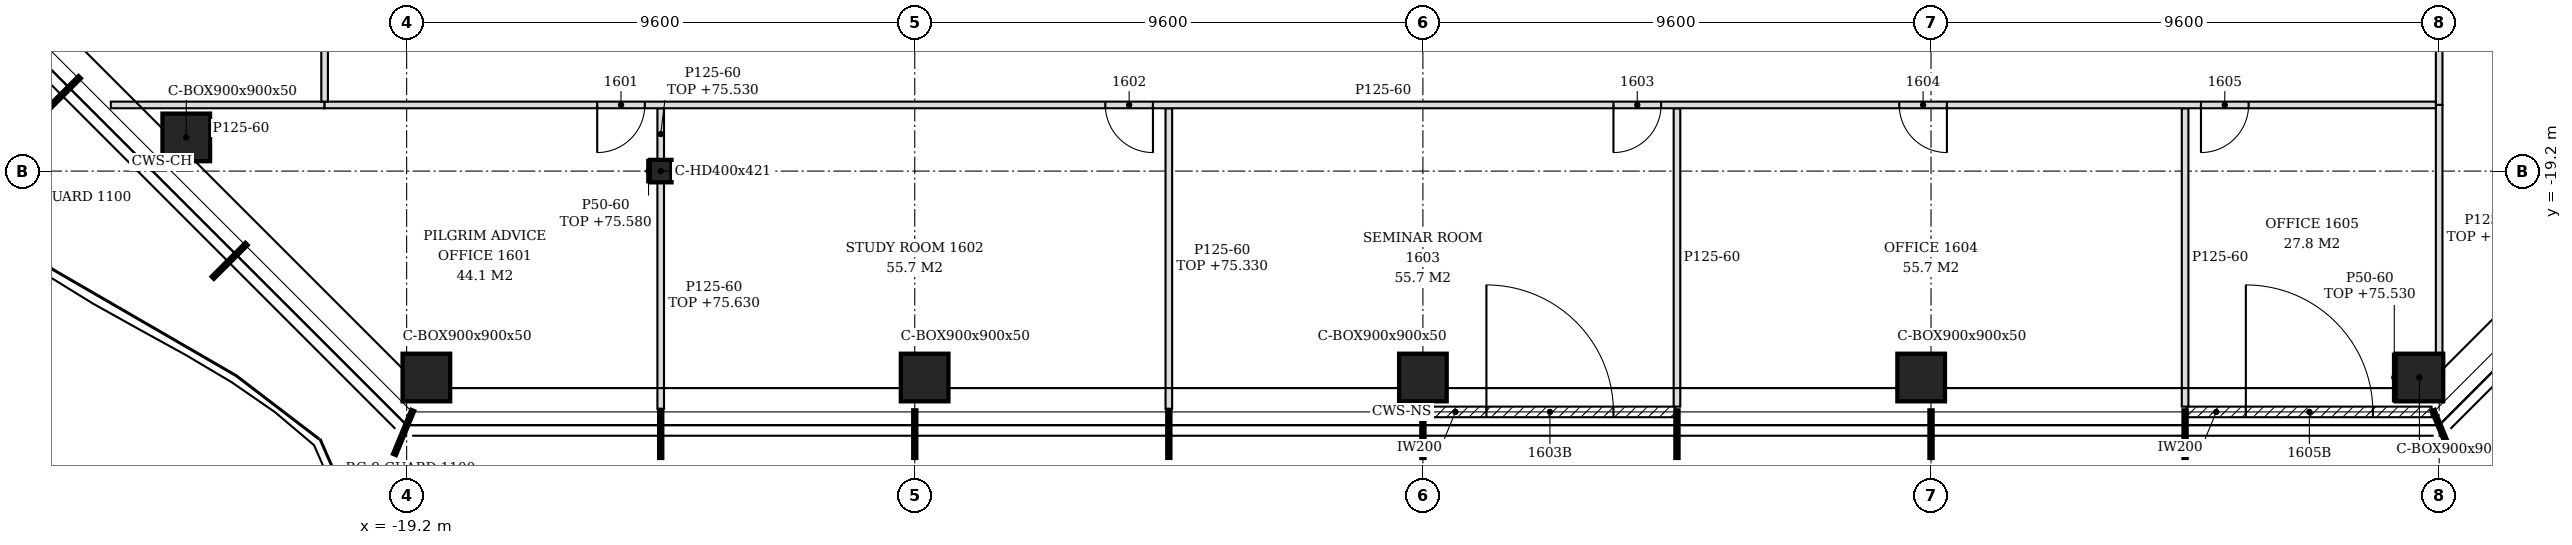
"""IFC4 building model, lengths in metres.
Left out: names, types, materials, properties, quantities, classifications, styles, units other than length and angle.
Written with IfcOpenShell. Run it as: python <this file> out.ifc"""

import sys

from ifc_helpers import new_model, si_unit, direction, frame, frame_2d, origin, origin_2d, place, context, subcontext, project, spatial, polyline, rectangle, hollow_rectangle, i_section, outline, extrude, element, fill, save


model = new_model("IFC4")
c1 = context("Model", 3, precision=1e-05, world=origin(), true_north=direction((0.0, 1.0)))
c2 = subcontext(c1, "Body", "Model", "MODEL_VIEW")
j1 = project(units=[si_unit("LENGTHUNIT", "METRE"), si_unit("PLANEANGLEUNIT", "RADIAN")], contexts=[c1])
p1 = place(None, origin())
s1 = spatial("IfcSite", under=j1, at=p1, CompositionType="ELEMENT")
p2 = place(p1, origin())
s2 = spatial("IfcBuilding", under=s1, at=p2, CompositionType="ELEMENT")
p3 = place(p2, frame((0.0, 0.0, 72.6)))
s3 = spatial("IfcBuildingStorey", under=s2, at=p3, CompositionType="ELEMENT", Elevation=72.6)
for number, where, z_axis, x_axis in (
    (1, (-18.827, -23.1, -0.15), (0.0, 0.0, 1.0), (1.0, 0.0, 0.0)),
    (2, (-9.414, -23.1, -0.15), (0.0, 0.0, 1.0), (1.0, 0.0, 0.0)),
    (3, (0.0, -23.1, -0.15), (0.0, 0.0, 1.0), (1.0, 0.0, 0.0)),
    (4, (9.414, -23.1, -0.15), (0.0, 0.0, 1.0), (1.0, 0.0, 0.0)),
    (5, (18.827, -23.1, -0.15), (0.0, 0.0, 1.0), (1.0, 0.0, 0.0)),
    (6, (-23.364, -18.564, -0.15), (0.0, 0.0, 1.0), (1.0, 0.0, 0.0)),
):
    element("IfcColumn", number, at=place(p3, frame(where, z_axis=z_axis, x_axis=x_axis)), inside=s3, PredefinedType="COLUMN", context=c2, shape_type="SweptSolid", body=[
        extrude(hollow_rectangle(XDim=0.9, YDim=0.9, WallThickness=0.05, at=origin_2d()), origin(), (0.0, 0.0, 1.0), 3.6),
    ])
p4 = place(p3, frame((-14.4, -19.2, -0.15), z_axis=(0.0, 0.0, 1.0), x_axis=(1.0, 0.0, 0.0)))
e7 = element("IfcColumn", 7, at=p4, inside=s3, PredefinedType="COLUMN", context=c2, shape_type="SweptSolid", body=[
    extrude(i_section(OverallWidth=0.409, OverallDepth=0.425, WebThickness=0.033, FlangeThickness=0.052, FilletRadius=0.015, at=origin_2d()), origin(), (0.0, 0.0, 1.0), 3.6),
])
p5 = place(p3, frame((0.03, -23.75, 0.0), z_axis=(0.0, 0.0, 1.0), x_axis=(1.0, 0.0, 0.0)))
e8 = element("IfcWall", 8, at=p5, inside=s3, PredefinedType="NOTDEFINED", context=c2, shape_type="SweptSolid", body=[
    extrude(rectangle(XDim=4.74, YDim=0.2, at=frame_2d((2.37, 0.0))), origin(), (0.0, 0.0, 1.0), 3.45),
])
p6 = place(p5, frame((1.17, 0.0, 0.0)))
e9 = element("IfcOpeningElement", 9, at=p6, cuts=e8, PredefinedType="OPENING", context=c2, shape_type="SweptSolid", body=[
    extrude(rectangle(XDim=2.4, YDim=2.4, at=frame_2d((1.2, 1.2))), frame((0.0, 0.11, 0.0), z_axis=(0.0, -1.0, 0.0), x_axis=(1.0, 0.0, 0.0)), (0.0, 0.0, 1.0), 0.22),
])
p7 = place(p3, frame((14.43, -23.75, 0.0), z_axis=(0.0, 0.0, 1.0), x_axis=(1.0, 0.0, 0.0)))
e10 = element("IfcWall", 10, at=p7, inside=s3, PredefinedType="NOTDEFINED", context=c2, shape_type="SweptSolid", body=[
    extrude(rectangle(XDim=4.626, YDim=0.2, at=frame_2d((2.313, 0.0))), origin(), (0.0, 0.0, 1.0), 3.45),
])
p8 = place(p7, frame((1.118, 0.0, 0.0)))
e11 = element("IfcOpeningElement", 11, at=p8, cuts=e10, PredefinedType="OPENING", context=c2, shape_type="SweptSolid", body=[
    extrude(rectangle(XDim=2.4, YDim=2.4, at=frame_2d((1.2, 1.2))), frame((0.0, 0.11, 0.0), z_axis=(0.0, -1.0, 0.0), x_axis=(1.0, 0.0, 0.0)), (0.0, 0.0, 1.0), 0.22),
])
p9 = place(p3, frame((-14.4, -23.69, 0.0), z_axis=(0.0, 0.0, 1.0), x_axis=(0.0, 1.0, 0.0)))
e12 = element("IfcWall", 12, at=p9, inside=s3, PredefinedType="PARTITIONING", context=c2, shape_type="SweptSolid", body=[
    extrude(outline(polyline([(0.0, 0.0), (4.277, 0.0), (4.278, 3.03), (0.74, 3.03), (0.738, 2.93), (0.44, 2.93), (0.438, 3.03), (0.0, 3.03), (0.0, 0.0)])), frame((0.0, 0.062, 0.0), z_axis=(0.0, -1.0, 0.0), x_axis=(1.0, 0.0, 0.0)), (0.0, 0.0, 1.0), 0.125),
])
p10 = place(p3, frame((-4.8, -23.69, 0.0), z_axis=(0.0, 0.0, 1.0), x_axis=(0.0, 1.0, 0.0)))
e13 = element("IfcWall", 13, at=p10, inside=s3, PredefinedType="PARTITIONING", context=c2, shape_type="SweptSolid", body=[
    extrude(rectangle(XDim=5.677, YDim=0.125, at=frame_2d((2.839, 0.0))), origin(), (0.0, 0.0, 1.0), 2.73),
])
for number, where, z_axis, x_axis in (
    (14, (4.8, -23.65, 0.0), (0.0, 0.0, 1.0), (0.0, 1.0, 0.0)),
    (15, (14.4, -23.65, 0.0), (0.0, 0.0, 1.0), (0.0, 1.0, 0.0)),
):
    element("IfcWall", number, at=place(p3, frame(where, z_axis=z_axis, x_axis=x_axis)), inside=s3, PredefinedType="PARTITIONING", context=c2, shape_type="SweptSolid", body=[
        extrude(outline(polyline([(0.0, 0.0), (5.637, 0.0), (5.637, 3.45), (4.555, 3.45), (4.553, 2.88), (4.345, 2.88), (4.343, 3.45), (0.7, 3.45), (0.698, 2.93), (0.4, 2.93), (0.398, 3.45), (0.0, 3.45), (0.0, 0.0)])), frame((0.0, 0.062, 0.0), z_axis=(0.0, -1.0, 0.0), x_axis=(1.0, 0.0, 0.0)), (0.0, 0.0, 1.0), 0.125),
    ])
p11 = place(p3, frame((19.2, -22.65, 0.0), z_axis=(0.0, 0.0, 1.0), x_axis=(0.0, 1.0, 0.0)))
e16 = element("IfcWall", 16, at=p11, inside=s3, PredefinedType="PARTITIONING", context=c2, shape_type="SweptSolid", body=[
    extrude(outline(polyline([(0.0, 0.0), (4.7, 0.0), (4.7, 2.73), (0.48, 2.73), (0.478, 2.63), (0.0, 2.63), (0.0, 0.0)])), frame((0.0, 0.062, 0.0), z_axis=(0.0, -1.0, 0.0), x_axis=(1.0, 0.0, 0.0)), (0.0, 0.0, 1.0), 0.125),
])
p12 = place(p3, frame((-14.4, -18.988, 0.0), z_axis=(0.0, 0.0, 1.0), x_axis=(0.0, 1.0, 0.0)))
e17 = element("IfcWall", 17, at=p12, inside=s3, PredefinedType="PARTITIONING", context=c2, shape_type="SweptSolid", body=[
    extrude(rectangle(XDim=0.975, YDim=0.125, at=frame_2d((0.488, 0.0))), origin(), (0.0, 0.0, 1.0), 2.93),
])
p13 = place(p3, frame((-24.789, -17.95, 0.0), z_axis=(0.0, 0.0, 1.0), x_axis=(1.0, 0.0, 0.0)))
e18 = element("IfcWall", 18, at=p13, inside=s3, PredefinedType="PARTITIONING", context=c2, shape_type="SweptSolid", body=[
    extrude(outline(polyline([(0.0, 0.0), (4.039, 0.0), (4.039, 3.45), (1.086, 3.45), (1.084, 2.93), (0.537, 2.93), (0.535, 3.45), (0.0, 3.45), (0.0, 0.0)])), frame((0.0, 0.062, 0.0), z_axis=(0.0, -1.0, 0.0), x_axis=(1.0, 0.0, 0.0)), (0.0, 0.0, 1.0), 0.125),
])
p14 = place(p3, frame((-20.75, -17.95, 0.0), z_axis=(0.0, 0.0, 1.0), x_axis=(1.0, 0.0, 0.0)))
e19 = element("IfcWall", 19, at=p14, inside=s3, PredefinedType="PARTITIONING", context=c2, shape_type="SweptSolid", body=[
    extrude(outline(polyline([(0.0, 0.0), (39.887, 0.0), (39.887, 2.73), (39.8, 2.73), (39.798, 3.45), (28.1, 3.45), (28.098, 2.73), (27.8, 2.73), (27.798, 3.45), (16.1, 3.45), (16.098, 2.73), (15.8, 2.73), (15.798, 3.45), (6.5, 3.45), (6.498, 2.93), (6.2, 2.93), (6.198, 3.45), (0.0, 3.45), (0.0, 0.0)])), frame((0.0, 0.062, 0.0), z_axis=(0.0, -1.0, 0.0), x_axis=(1.0, 0.0, 0.0)), (0.0, 0.0, 1.0), 0.125),
])
p15 = place(p14, frame((5.15, 0.0, 0.0)))
e20 = element("IfcOpeningElement", 20, at=p15, cuts=e19, PredefinedType="OPENING", context=c2, shape_type="SweptSolid", body=[
    extrude(rectangle(XDim=0.9, YDim=2.1, at=frame_2d((0.45, 1.05))), frame((0.0, 0.073, 0.0), z_axis=(0.0, -1.0, 0.0), x_axis=(1.0, 0.0, 0.0)), (0.0, 0.0, 1.0), 0.145),
])
p16 = place(p14, frame((14.75, 0.0, 0.0)))
e21 = element("IfcOpeningElement", 21, at=p16, cuts=e19, PredefinedType="OPENING", context=c2, shape_type="SweptSolid", body=[
    extrude(rectangle(XDim=0.9, YDim=2.1, at=frame_2d((0.45, 1.05))), frame((0.0, 0.073, 0.0), z_axis=(0.0, -1.0, 0.0), x_axis=(1.0, 0.0, 0.0)), (0.0, 0.0, 1.0), 0.145),
])
p17 = place(p14, frame((24.35, 0.0, 0.0)))
e22 = element("IfcOpeningElement", 22, at=p17, cuts=e19, PredefinedType="OPENING", context=c2, shape_type="SweptSolid", body=[
    extrude(rectangle(XDim=0.9, YDim=2.1, at=frame_2d((0.45, 1.05))), frame((0.0, 0.073, 0.0), z_axis=(0.0, -1.0, 0.0), x_axis=(1.0, 0.0, 0.0)), (0.0, 0.0, 1.0), 0.145),
])
p18 = place(p14, frame((29.75, 0.0, 0.0)))
e23 = element("IfcOpeningElement", 23, at=p18, cuts=e19, PredefinedType="OPENING", context=c2, shape_type="SweptSolid", body=[
    extrude(rectangle(XDim=0.9, YDim=2.1, at=frame_2d((0.45, 1.05))), frame((0.0, 0.073, 0.0), z_axis=(0.0, -1.0, 0.0), x_axis=(1.0, 0.0, 0.0)), (0.0, 0.0, 1.0), 0.145),
])
p19 = place(p14, frame((35.45, 0.0, 0.0)))
e24 = element("IfcOpeningElement", 24, at=p19, cuts=e19, PredefinedType="OPENING", context=c2, shape_type="SweptSolid", body=[
    extrude(rectangle(XDim=0.9, YDim=2.1, at=frame_2d((0.45, 1.05))), frame((0.0, 0.073, 0.0), z_axis=(0.0, -1.0, 0.0), x_axis=(1.0, 0.0, 0.0)), (0.0, 0.0, 1.0), 0.145),
])
p20 = place(p3, frame((-20.75, -17.887, 0.0), z_axis=(0.0, 0.0, 1.0), x_axis=(0.0, 1.0, 0.0)))
e25 = element("IfcWall", 25, at=p20, inside=s3, PredefinedType="PARTITIONING", context=c2, shape_type="SweptSolid", body=[
    extrude(outline(polyline([(0.0, 0.0), (39.876, 0.0), (39.876, 3.45), (39.622, 3.45), (39.62, 2.63), (38.507, 2.63), (38.505, 3.45), (37.183, 3.45), (37.18, 2.98), (36.992, 2.98), (36.99, 3.45), (32.397, 3.45), (32.396, 2.83), (32.177, 2.83), (32.176, 3.45), (27.597, 3.45), (27.595, 2.83), (27.377, 2.83), (27.375, 3.45), (22.798, 3.45), (22.795, 2.83), (22.577, 2.83), (22.575, 3.45), (17.998, 3.45), (17.996, 2.83), (17.778, 2.83), (17.775, 3.45), (13.198, 3.45), (13.196, 2.83), (12.978, 2.83), (12.976, 3.45), (8.397, 3.45), (8.396, 2.83), (8.177, 2.83), (8.176, 3.45), (3.597, 3.45), (3.595, 2.83), (3.377, 2.83), (3.375, 3.45), (0.0, 3.45), (0.0, 0.0)])), frame((0.0, 0.062, 0.0), z_axis=(0.0, -1.0, 0.0), x_axis=(1.0, 0.0, 0.0)), (0.0, 0.0, 1.0), 0.125),
])
p21 = place(p20, frame((4.738, 0.0, 0.0)))
e26 = element("IfcOpeningElement", 26, at=p21, cuts=e25, PredefinedType="OPENING", context=c2, shape_type="SweptSolid", body=[
    extrude(rectangle(XDim=0.9, YDim=2.1, at=frame_2d((0.45, 1.05))), frame((0.0, 0.073, 0.0), z_axis=(0.0, -1.0, 0.0), x_axis=(1.0, 0.0, 0.0)), (0.0, 0.0, 1.0), 0.145),
])
p22 = place(p20, frame((13.387, 0.0, 0.0)))
e27 = element("IfcOpeningElement", 27, at=p22, cuts=e25, PredefinedType="OPENING", context=c2, shape_type="SweptSolid", body=[
    extrude(rectangle(XDim=0.9, YDim=2.1, at=frame_2d((0.45, 1.05))), frame((0.0, 0.073, 0.0), z_axis=(0.0, -1.0, 0.0), x_axis=(1.0, 0.0, 0.0)), (0.0, 0.0, 1.0), 0.145),
])
p23 = place(p20, frame((20.988, 0.0, 0.0)))
e28 = element("IfcOpeningElement", 28, at=p23, cuts=e25, PredefinedType="OPENING", context=c2, shape_type="SweptSolid", body=[
    extrude(rectangle(XDim=0.9, YDim=2.1, at=frame_2d((0.45, 1.05))), frame((0.0, 0.073, 0.0), z_axis=(0.0, -1.0, 0.0), x_axis=(1.0, 0.0, 0.0)), (0.0, 0.0, 1.0), 0.145),
])
p24 = place(p20, frame((31.387, 0.0, 0.0)))
e29 = element("IfcOpeningElement", 29, at=p24, cuts=e25, PredefinedType="OPENING", context=c2, shape_type="SweptSolid", body=[
    extrude(rectangle(XDim=0.9, YDim=2.1, at=frame_2d((0.45, 1.05))), frame((0.0, 0.073, 0.0), z_axis=(0.0, -1.0, 0.0), x_axis=(1.0, 0.0, 0.0)), (0.0, 0.0, 1.0), 0.145),
])
p25 = place(p3, frame((19.2, -17.95, 0.0), z_axis=(0.0, 0.0, 1.0), x_axis=(0.0, 1.0, 0.0)))
e30 = element("IfcWall", 30, at=p25, inside=s3, PredefinedType="PARTITIONING", context=c2, shape_type="SweptSolid", body=[
    extrude(rectangle(XDim=9.313, YDim=0.125, at=frame_2d((4.656, 0.0))), origin(), (0.0, 0.0, 1.0), 2.73),
])
p26 = place(p25, frame((7.65, 0.0, 0.0)))
e31 = element("IfcOpeningElement", 31, at=p26, cuts=e30, PredefinedType="OPENING", context=c2, shape_type="SweptSolid", body=[
    extrude(rectangle(XDim=0.9, YDim=2.1, at=frame_2d((0.45, 1.05))), frame((0.0, 0.073, 0.0), z_axis=(0.0, -1.0, 0.0), x_axis=(1.0, 0.0, 0.0)), (0.0, 0.0, 1.0), 0.145),
])
p27 = place(p3, frame((-14.629, -19.413, 0.0), z_axis=(0.0, 0.0, 1.0), x_axis=(0.0, 1.0, 0.0)))
e32 = element("IfcWall", 32, at=p27, inside=s3, PredefinedType="PARTITIONING", context=c2, shape_type="SweptSolid", body=[
    extrude(rectangle(XDim=0.425, YDim=0.05, at=frame_2d((0.212, 0.0))), origin(), (0.0, 0.0, 1.0), 2.98),
])
p28 = place(p3, frame((18.352, -23.55, 0.0), z_axis=(0.0, 0.0, 1.0), x_axis=(0.0, 1.0, 0.0)))
e33 = element("IfcWall", 33, at=p28, inside=s3, PredefinedType="PARTITIONING", context=c2, shape_type="SweptSolid", body=[
    extrude(rectangle(XDim=0.9, YDim=0.05, at=frame_2d((0.45, 0.0))), origin(), (0.0, 0.0, 1.0), 2.93),
])
p29 = place(p6, origin())
e34 = element("IfcDoor", 34, at=p29, inside=s3, OperationType="SINGLE_SWING_LEFT", PredefinedType="DOOR", context=c2, shape_type="SweptSolid", body=[
    extrude(rectangle(XDim=2.4, YDim=2.4, at=frame_2d((1.2, 1.2))), frame((0.0, 0.025, 0.0), z_axis=(0.0, -1.0, 0.0), x_axis=(1.0, 0.0, 0.0)), (0.0, 0.0, 1.0), 0.05),
])
fill(e9, e34)
p30 = place(p8, origin())
e35 = element("IfcDoor", 35, at=p30, inside=s3, OperationType="SINGLE_SWING_LEFT", PredefinedType="DOOR", context=c2, shape_type="SweptSolid", body=[
    extrude(rectangle(XDim=2.4, YDim=2.4, at=frame_2d((1.2, 1.2))), frame((0.0, 0.025, 0.0), z_axis=(0.0, -1.0, 0.0), x_axis=(1.0, 0.0, 0.0)), (0.0, 0.0, 1.0), 0.05),
])
fill(e11, e35)
p31 = place(p15, frame((0.9, 0.0, 0.0), z_axis=(0.0, 0.0, 1.0), x_axis=(-1.0, 0.0, 0.0)))
e36 = element("IfcDoor", 36, at=p31, inside=s3, OperationType="SINGLE_SWING_RIGHT", PredefinedType="DOOR", context=c2, shape_type="SweptSolid", body=[
    extrude(rectangle(XDim=0.9, YDim=2.1, at=frame_2d((0.45, 1.05))), frame((0.0, 0.025, 0.0), z_axis=(0.0, -1.0, 0.0), x_axis=(1.0, 0.0, 0.0)), (0.0, 0.0, 1.0), 0.05),
])
fill(e20, e36)
p32 = place(p16, frame((0.9, 0.0, 0.0), z_axis=(0.0, 0.0, 1.0), x_axis=(-1.0, 0.0, 0.0)))
e37 = element("IfcDoor", 37, at=p32, inside=s3, OperationType="SINGLE_SWING_LEFT", PredefinedType="DOOR", context=c2, shape_type="SweptSolid", body=[
    extrude(rectangle(XDim=0.9, YDim=2.1, at=frame_2d((0.45, 1.05))), frame((0.0, 0.025, 0.0), z_axis=(0.0, -1.0, 0.0), x_axis=(1.0, 0.0, 0.0)), (0.0, 0.0, 1.0), 0.05),
])
fill(e21, e37)
p33 = place(p17, frame((0.9, 0.0, 0.0), z_axis=(0.0, 0.0, 1.0), x_axis=(-1.0, 0.0, 0.0)))
e38 = element("IfcDoor", 38, at=p33, inside=s3, OperationType="SINGLE_SWING_RIGHT", PredefinedType="DOOR", context=c2, shape_type="SweptSolid", body=[
    extrude(rectangle(XDim=0.9, YDim=2.1, at=frame_2d((0.45, 1.05))), frame((0.0, 0.025, 0.0), z_axis=(0.0, -1.0, 0.0), x_axis=(1.0, 0.0, 0.0)), (0.0, 0.0, 1.0), 0.05),
])
fill(e22, e38)
p34 = place(p18, frame((0.9, 0.0, 0.0), z_axis=(0.0, 0.0, 1.0), x_axis=(-1.0, 0.0, 0.0)))
e39 = element("IfcDoor", 39, at=p34, inside=s3, OperationType="SINGLE_SWING_LEFT", PredefinedType="DOOR", context=c2, shape_type="SweptSolid", body=[
    extrude(rectangle(XDim=0.9, YDim=2.1, at=frame_2d((0.45, 1.05))), frame((0.0, 0.025, 0.0), z_axis=(0.0, -1.0, 0.0), x_axis=(1.0, 0.0, 0.0)), (0.0, 0.0, 1.0), 0.05),
])
fill(e23, e39)
p35 = place(p19, frame((0.9, 0.0, 0.0), z_axis=(0.0, 0.0, 1.0), x_axis=(-1.0, 0.0, 0.0)))
e40 = element("IfcDoor", 40, at=p35, inside=s3, OperationType="SINGLE_SWING_RIGHT", PredefinedType="DOOR", context=c2, shape_type="SweptSolid", body=[
    extrude(rectangle(XDim=0.9, YDim=2.1, at=frame_2d((0.45, 1.05))), frame((0.0, 0.025, 0.0), z_axis=(0.0, -1.0, 0.0), x_axis=(1.0, 0.0, 0.0)), (0.0, 0.0, 1.0), 0.05),
])
fill(e24, e40)
save(model, sys.argv[1])
